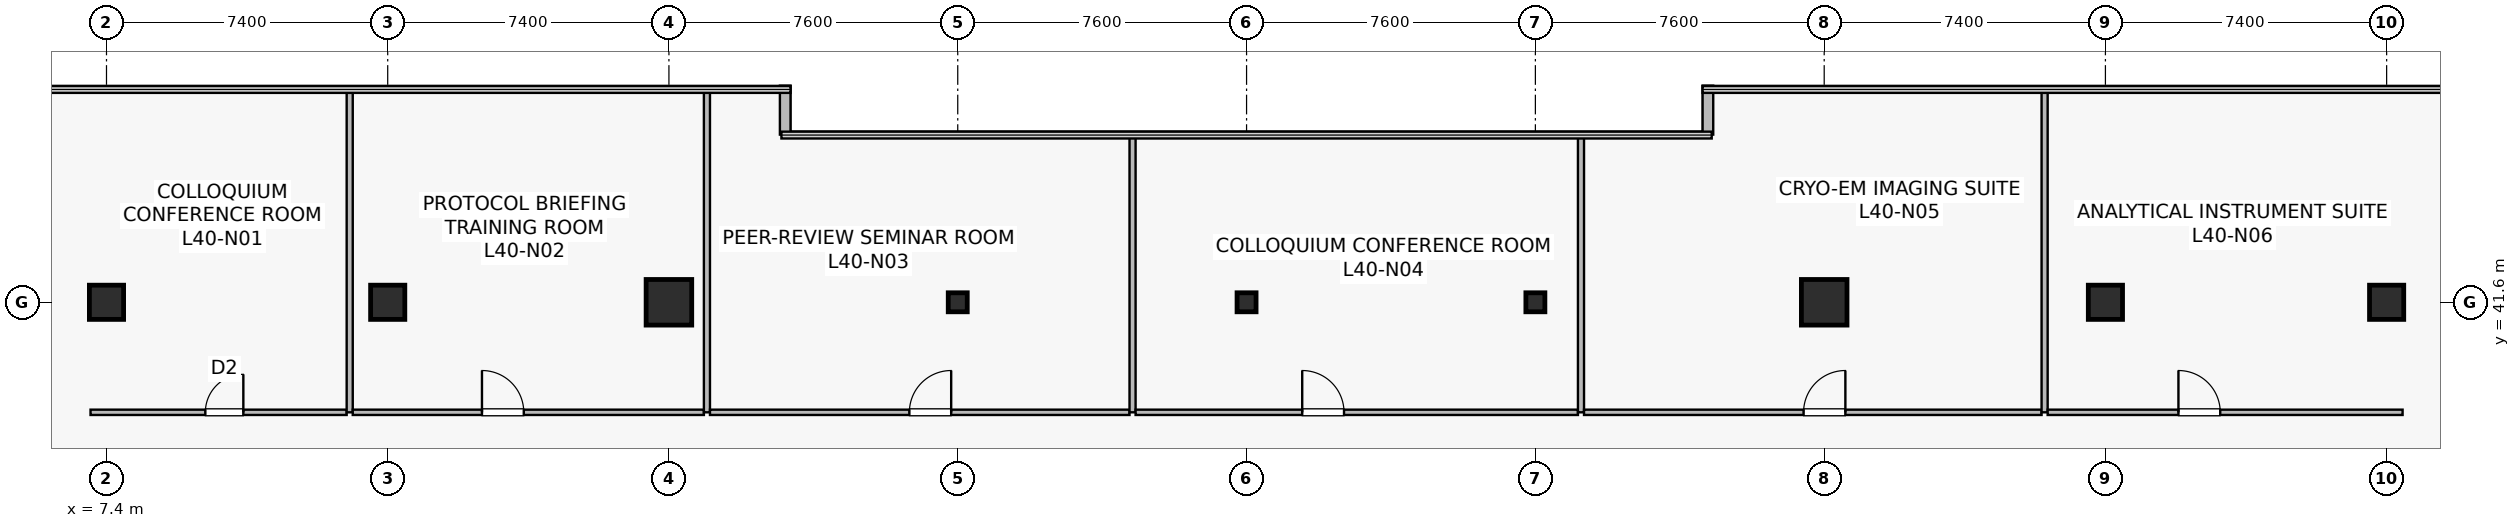
"""IFC4 building model, lengths in metres.
Left out: names, types, materials, properties, quantities, classifications, styles, units other than length and angle.
Written with IfcOpenShell. Run it as: python <this file> out.ifc"""

import sys

from ifc_helpers import new_model, si_unit, direction, frame, frame_2d, origin, origin_2d, place, context, subcontext, project, spatial, rectangle, hollow_rectangle, extrude, source, transform, mapped, element, fill, save


model = new_model("IFC4")
c1 = context("Model", 3, precision=1e-05, world=origin(), true_north=direction((0.0, 1.0)))
c2 = subcontext(c1, "Body", "Model", "MODEL_VIEW")
j1 = project(units=[si_unit("LENGTHUNIT", "METRE"), si_unit("PLANEANGLEUNIT", "RADIAN")], contexts=[c1])
p1 = place(None, origin())
s1 = spatial("IfcSite", under=j1, at=p1, CompositionType="ELEMENT")
p2 = place(p1, origin())
s2 = spatial("IfcBuilding", under=s1, at=p2, CompositionType="ELEMENT")
p3 = place(p2, frame((0.0, 0.0, 166.6)))
s3 = spatial("IfcBuildingStorey", under=s2, at=p3, CompositionType="ELEMENT", Elevation=166.6)
m1 = source(origin(), c2, "Body", "SweptSolid", [
    extrude(rectangle(XDim=0.9, YDim=0.9, at=origin_2d()), origin(), (0.0, 0.0, 1.0), 4.1),
])
p4 = place(p3, frame((14.8, 41.6, 0.0), z_axis=(0.0, 0.0, 1.0), x_axis=(1.0, 0.0, 0.0)))
e1 = element("IfcColumn", 1, at=p4, inside=s3, PredefinedType="COLUMN", context=c2, shape_type="MappedRepresentation", body=[
    mapped(m1, transform((0.0, 0.0, 0.0), scale=1.0)),
])
m2 = source(origin(), c2, "Body", "SweptSolid", [
    extrude(rectangle(XDim=1.2, YDim=1.2, at=origin_2d()), origin(), (0.0, 0.0, 1.0), 4.1),
])
for number, where, z_axis, x_axis in (
    (2, (22.2, 41.6, 0.0), (0.0, 0.0, 1.0), (1.0, 0.0, 0.0)),
    (3, (52.6, 41.6, 0.0), (0.0, 0.0, 1.0), (1.0, 0.0, 0.0)),
):
    element("IfcColumn", number, at=place(p3, frame(where, z_axis=z_axis, x_axis=x_axis)), inside=s3, PredefinedType="COLUMN", context=c2, shape_type="MappedRepresentation", body=[
        mapped(m2, transform((0.0, 0.0, 0.0), scale=1.0)),
    ])
for number, where, z_axis, x_axis in (
    (4, (60.0, 41.6, 0.0), (0.0, 0.0, 1.0), (1.0, 0.0, 0.0)),
    (5, (7.4, 41.6, 0.0), (0.0, 0.0, 1.0), (1.0, 0.0, 0.0)),
    (6, (67.4, 41.6, 0.0), (0.0, 0.0, 1.0), (1.0, 0.0, 0.0)),
):
    element("IfcColumn", number, at=place(p3, frame(where, z_axis=z_axis, x_axis=x_axis)), inside=s3, PredefinedType="COLUMN", context=c2, shape_type="MappedRepresentation", body=[
        mapped(m1, transform((0.0, 0.0, 0.0), scale=1.0)),
    ])
m3 = source(origin(), c2, "Body", "SweptSolid", [
    extrude(hollow_rectangle(XDim=0.5, YDim=0.5, WallThickness=0.022, at=origin_2d()), origin(), (0.0, 0.0, 1.0), 4.1),
])
for number, where, z_axis, x_axis in (
    (7, (29.8, 41.6, 0.0), (0.0, 0.0, 1.0), (1.0, 0.0, 0.0)),
    (8, (37.4, 41.6, 0.0), (0.0, 0.0, 1.0), (1.0, 0.0, 0.0)),
    (9, (45.0, 41.6, 0.0), (0.0, 0.0, 1.0), (1.0, 0.0, 0.0)),
):
    element("IfcColumn", number, at=place(p3, frame(where, z_axis=z_axis, x_axis=x_axis)), inside=s3, PredefinedType="COLUMN", context=c2, shape_type="MappedRepresentation", body=[
        mapped(m3, transform((0.0, 0.0, 0.0), scale=1.0)),
    ])
for number, where, z_axis, x_axis in (
    (10, (49.54, 47.3, 0.0), (0.0, 0.0, 1.0), (0.0, -1.0, 0.0)),
    (11, (25.26, 46.012, 0.0), (0.0, 0.0, 1.0), (0.0, 1.0, 0.0)),
):
    element("IfcWall", number, at=place(p3, frame(where, z_axis=z_axis, x_axis=x_axis)), inside=s3, PredefinedType="STANDARD", context=c2, shape_type="SweptSolid", body=[
        extrude(rectangle(XDim=1.288, YDim=0.28, at=frame_2d((0.644, 0.0))), origin(), (0.0, 0.0, 1.0), 3.79),
    ])
p5 = place(p3, frame((6.98, 38.705, 0.0), z_axis=(0.0, 0.0, 1.0), x_axis=(1.0, 0.0, 0.0)))
e12 = element("IfcWall", 12, at=p5, inside=s3, PredefinedType="PARTITIONING", context=c2, shape_type="SweptSolid", body=[
    extrude(rectangle(XDim=6.74, YDim=0.14, at=frame_2d((3.37, 0.0))), origin(), (0.0, 0.0, 1.0), 3.275),
])
p6 = place(p5, frame((3.021, 0.0, 0.0)))
e13 = element("IfcOpeningElement", 13, at=p6, cuts=e12, PredefinedType="OPENING", context=c2, shape_type="SweptSolid", body=[
    extrude(rectangle(XDim=1.0, YDim=2.15, at=frame_2d((0.5, 1.075))), frame((0.0, 0.08, 0.0), z_axis=(0.0, -1.0, 0.0), x_axis=(1.0, 0.0, 0.0)), (0.0, 0.0, 1.0), 0.16),
])
p7 = place(p3, frame((13.8, 38.705, 0.0), z_axis=(0.0, 0.0, 1.0), x_axis=(0.0, 1.0, 0.0)))
e14 = element("IfcWall", 14, at=p7, inside=s3, PredefinedType="PARTITIONING", context=c2, shape_type="SweptSolid", body=[
    extrude(rectangle(XDim=8.485, YDim=0.16, at=frame_2d((4.242, 0.0))), origin(), (0.0, 0.0, 1.0), 3.075),
])
p8 = place(p3, frame((13.88, 38.705, 0.0), z_axis=(0.0, 0.0, 1.0), x_axis=(1.0, 0.0, 0.0)))
e15 = element("IfcWall", 15, at=p8, inside=s3, PredefinedType="PARTITIONING", context=c2, shape_type="SweptSolid", body=[
    extrude(rectangle(XDim=9.24, YDim=0.14, at=frame_2d((4.62, 0.0))), origin(), (0.0, 0.0, 1.0), 3.187),
])
p9 = place(p8, frame((3.4, 0.0, 0.0)))
e16 = element("IfcOpeningElement", 16, at=p9, cuts=e15, PredefinedType="OPENING", context=c2, shape_type="SweptSolid", body=[
    extrude(rectangle(XDim=1.1, YDim=2.18, at=frame_2d((0.55, 1.09))), frame((0.0, 0.08, 0.0), z_axis=(0.0, -1.0, 0.0), x_axis=(1.0, 0.0, 0.0)), (0.0, 0.0, 1.0), 0.16),
])
p10 = place(p3, frame((23.2, 38.705, 0.0), z_axis=(0.0, 0.0, 1.0), x_axis=(0.0, 1.0, 0.0)))
e17 = element("IfcWall", 17, at=p10, inside=s3, PredefinedType="PARTITIONING", context=c2, shape_type="SweptSolid", body=[
    extrude(rectangle(XDim=8.485, YDim=0.16, at=frame_2d((4.242, 0.0))), origin(), (0.0, 0.0, 1.0), 3.075),
])
p11 = place(p3, frame((23.28, 38.705, 0.0), z_axis=(0.0, 0.0, 1.0), x_axis=(1.0, 0.0, 0.0)))
e18 = element("IfcWall", 18, at=p11, inside=s3, PredefinedType="PARTITIONING", context=c2, shape_type="SweptSolid", body=[
    extrude(rectangle(XDim=11.04, YDim=0.14, at=frame_2d((5.52, 0.0))), origin(), (0.0, 0.0, 1.0), 3.187),
])
p12 = place(p11, frame((5.247, 0.0, 0.0)))
e19 = element("IfcOpeningElement", 19, at=p12, cuts=e18, PredefinedType="OPENING", context=c2, shape_type="SweptSolid", body=[
    extrude(rectangle(XDim=1.1, YDim=2.18, at=frame_2d((0.55, 1.09))), frame((0.0, 0.08, 0.0), z_axis=(0.0, -1.0, 0.0), x_axis=(1.0, 0.0, 0.0)), (0.0, 0.0, 1.0), 0.16),
])
p13 = place(p3, frame((34.4, 38.705, 0.0), z_axis=(0.0, 0.0, 1.0), x_axis=(0.0, 1.0, 0.0)))
e20 = element("IfcWall", 20, at=p13, inside=s3, PredefinedType="PARTITIONING", context=c2, shape_type="SweptSolid", body=[
    extrude(rectangle(XDim=7.285, YDim=0.16, at=frame_2d((3.643, 0.0))), origin(), (0.0, 0.0, 1.0), 3.075),
])
p14 = place(p3, frame((34.48, 38.705, 0.0), z_axis=(0.0, 0.0, 1.0), x_axis=(1.0, 0.0, 0.0)))
e21 = element("IfcWall", 21, at=p14, inside=s3, PredefinedType="PARTITIONING", context=c2, shape_type="SweptSolid", body=[
    extrude(rectangle(XDim=11.64, YDim=0.14, at=frame_2d((5.82, 0.0))), origin(), (0.0, 0.0, 1.0), 3.187),
])
p15 = place(p14, frame((4.385, 0.0, 0.0)))
e22 = element("IfcOpeningElement", 22, at=p15, cuts=e21, PredefinedType="OPENING", context=c2, shape_type="SweptSolid", body=[
    extrude(rectangle(XDim=1.1, YDim=2.18, at=frame_2d((0.55, 1.09))), frame((0.0, 0.08, 0.0), z_axis=(0.0, -1.0, 0.0), x_axis=(1.0, 0.0, 0.0)), (0.0, 0.0, 1.0), 0.16),
])
p16 = place(p3, frame((46.2, 38.705, 0.0), z_axis=(0.0, 0.0, 1.0), x_axis=(0.0, 1.0, 0.0)))
e23 = element("IfcWall", 23, at=p16, inside=s3, PredefinedType="PARTITIONING", context=c2, shape_type="SweptSolid", body=[
    extrude(rectangle(XDim=7.285, YDim=0.16, at=frame_2d((3.643, 0.0))), origin(), (0.0, 0.0, 1.0), 3.075),
])
p17 = place(p3, frame((46.28, 38.705, 0.0), z_axis=(0.0, 0.0, 1.0), x_axis=(1.0, 0.0, 0.0)))
e24 = element("IfcWall", 24, at=p17, inside=s3, PredefinedType="PARTITIONING", context=c2, shape_type="SweptSolid", body=[
    extrude(rectangle(XDim=12.04, YDim=0.14, at=frame_2d((6.02, 0.0))), origin(), (0.0, 0.0, 1.0), 3.187),
])
p18 = place(p17, frame((5.777, 0.0, 0.0)))
e25 = element("IfcOpeningElement", 25, at=p18, cuts=e24, PredefinedType="OPENING", context=c2, shape_type="SweptSolid", body=[
    extrude(rectangle(XDim=1.1, YDim=2.18, at=frame_2d((0.55, 1.09))), frame((0.0, 0.08, 0.0), z_axis=(0.0, -1.0, 0.0), x_axis=(1.0, 0.0, 0.0)), (0.0, 0.0, 1.0), 0.16),
])
p19 = place(p3, frame((58.4, 38.705, 0.0), z_axis=(0.0, 0.0, 1.0), x_axis=(0.0, 1.0, 0.0)))
e26 = element("IfcWall", 26, at=p19, inside=s3, PredefinedType="PARTITIONING", context=c2, shape_type="SweptSolid", body=[
    extrude(rectangle(XDim=8.485, YDim=0.16, at=frame_2d((4.242, 0.0))), origin(), (0.0, 0.0, 1.0), 3.075),
])
p20 = place(p3, frame((58.48, 38.705, 0.0), z_axis=(0.0, 0.0, 1.0), x_axis=(1.0, 0.0, 0.0)))
e27 = element("IfcWall", 27, at=p20, inside=s3, PredefinedType="PARTITIONING", context=c2, shape_type="SweptSolid", body=[
    extrude(rectangle(XDim=9.34, YDim=0.14, at=frame_2d((4.67, 0.0))), origin(), (0.0, 0.0, 1.0), 3.187),
])
p21 = place(p20, frame((3.441, 0.0, 0.0)))
e28 = element("IfcOpeningElement", 28, at=p21, cuts=e27, PredefinedType="OPENING", context=c2, shape_type="SweptSolid", body=[
    extrude(rectangle(XDim=1.1, YDim=2.18, at=frame_2d((0.55, 1.09))), frame((0.0, 0.08, 0.0), z_axis=(0.0, -1.0, 0.0), x_axis=(1.0, 0.0, 0.0)), (0.0, 0.0, 1.0), 0.16),
])
m4 = source(origin(), c2, "Body", "SweptSolid", [
    extrude(rectangle(XDim=1.0, YDim=2.15, at=frame_2d((0.5, 1.075))), frame((0.0, 0.025, 0.0), z_axis=(0.0, -1.0, 0.0), x_axis=(1.0, 0.0, 0.0)), (0.0, 0.0, 1.0), 0.05),
])
p22 = place(p6, origin())
e29 = element("IfcDoor", 29, at=p22, inside=s3, OperationType="SINGLE_SWING_RIGHT", PredefinedType="DOOR", context=c2, shape_type="MappedRepresentation", body=[
    mapped(m4, transform((0.0, 0.0, 0.0), scale=1.0)),
])
fill(e13, e29)
m5 = source(origin(), c2, "Body", "SweptSolid", [
    extrude(rectangle(XDim=1.1, YDim=2.18, at=frame_2d((0.55, 1.09))), frame((0.0, 0.025, 0.0), z_axis=(0.0, -1.0, 0.0), x_axis=(1.0, 0.0, 0.0)), (0.0, 0.0, 1.0), 0.05),
])
p23 = place(p9, origin())
e30 = element("IfcDoor", 30, at=p23, inside=s3, OperationType="SINGLE_SWING_LEFT", PredefinedType="DOOR", context=c2, shape_type="MappedRepresentation", body=[
    mapped(m5, transform((0.0, 0.0, 0.0), scale=1.0)),
])
fill(e16, e30)
p24 = place(p12, origin())
e31 = element("IfcDoor", 31, at=p24, inside=s3, OperationType="SINGLE_SWING_RIGHT", PredefinedType="DOOR", context=c2, shape_type="MappedRepresentation", body=[
    mapped(m5, transform((0.0, 0.0, 0.0), scale=1.0)),
])
fill(e19, e31)
p25 = place(p15, origin())
e32 = element("IfcDoor", 32, at=p25, inside=s3, OperationType="SINGLE_SWING_LEFT", PredefinedType="DOOR", context=c2, shape_type="MappedRepresentation", body=[
    mapped(m5, transform((0.0, 0.0, 0.0), scale=1.0)),
])
fill(e22, e32)
p26 = place(p18, origin())
e33 = element("IfcDoor", 33, at=p26, inside=s3, OperationType="SINGLE_SWING_RIGHT", PredefinedType="DOOR", context=c2, shape_type="MappedRepresentation", body=[
    mapped(m5, transform((0.0, 0.0, 0.0), scale=1.0)),
])
fill(e25, e33)
p27 = place(p21, origin())
e34 = element("IfcDoor", 34, at=p27, inside=s3, OperationType="SINGLE_SWING_LEFT", PredefinedType="DOOR", context=c2, shape_type="MappedRepresentation", body=[
    mapped(m5, transform((0.0, 0.0, 0.0), scale=1.0)),
])
fill(e28, e34)
save(model, sys.argv[1])
